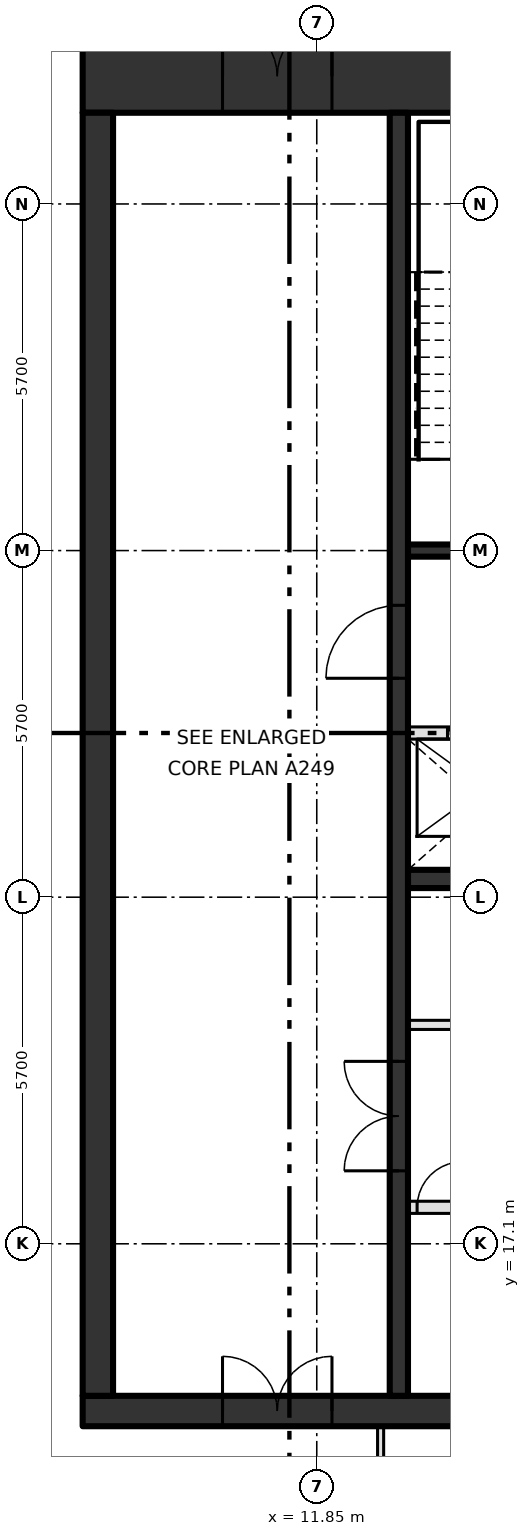
"""IFC4 building model, lengths in metres.
Left out: names, types, materials, properties, quantities, classifications, styles, units other than length and angle.
Written with IfcOpenShell. Run it as: python <this file> out.ifc"""

import sys

from ifc_helpers import new_model, si_unit, direction, frame, frame_2d, origin, place, context, subcontext, project, spatial, rectangle, extrude, element, fill, save


model = new_model("IFC4")
c1 = context("Model", 3, precision=1e-05, world=origin(), true_north=direction((0.0, 1.0)))
c2 = subcontext(c1, "Body", "Model", "MODEL_VIEW")
j1 = project(units=[si_unit("LENGTHUNIT", "METRE"), si_unit("PLANEANGLEUNIT", "RADIAN")], contexts=[c1])
p1 = place(None, origin())
s1 = spatial("IfcSite", under=j1, at=p1, CompositionType="ELEMENT")
p2 = place(p1, origin())
s2 = spatial("IfcBuilding", under=s1, at=p2, CompositionType="ELEMENT")
p3 = place(p2, frame((0.0, 0.0, 379.2)))
s3 = spatial("IfcBuildingStorey", under=s2, at=p3, CompositionType="ELEMENT", Elevation=379.2)
p4 = place(p3, frame((8.0, 14.35, -0.3), z_axis=(0.0, 0.0, 1.0), x_axis=(1.0, 0.0, 0.0)))
e1 = element("IfcWall", 1, at=p4, inside=s3, PredefinedType="SHEAR", context=c2, shape_type="SweptSolid", body=[
    extrude(rectangle(XDim=22.8, YDim=0.5, at=frame_2d((11.4, 0.0))), origin(), (0.0, 0.0, 1.0), 4.2),
])
p5 = place(p4, frame((2.3, 0.0, 0.3)))
e2 = element("IfcOpeningElement", 2, at=p5, cuts=e1, PredefinedType="OPENING", context=c2, shape_type="SweptSolid", body=[
    extrude(rectangle(XDim=1.8, YDim=2.1, at=frame_2d((0.9, 1.05))), frame((0.0, 0.26, 0.0), z_axis=(0.0, -1.0, 0.0), x_axis=(1.0, 0.0, 0.0)), (0.0, 0.0, 1.0), 0.52),
])
p6 = place(p3, frame((8.0, 36.3, -0.3), z_axis=(0.0, 0.0, 1.0), x_axis=(1.0, 0.0, 0.0)))
e3 = element("IfcWall", 3, at=p6, inside=s3, PredefinedType="SHEAR", context=c2, shape_type="SweptSolid", body=[
    extrude(rectangle(XDim=22.8, YDim=1.2, at=frame_2d((11.4, 0.0))), origin(), (0.0, 0.0, 1.0), 4.2),
])
p7 = place(p6, frame((2.3, 0.0, 0.3)))
e4 = element("IfcOpeningElement", 4, at=p7, cuts=e3, PredefinedType="OPENING", context=c2, shape_type="SweptSolid", body=[
    extrude(rectangle(XDim=1.8, YDim=2.1, at=frame_2d((0.9, 1.05))), frame((0.0, 0.61, 0.0), z_axis=(0.0, -1.0, 0.0), x_axis=(1.0, 0.0, 0.0)), (0.0, 0.0, 1.0), 1.22),
])
p8 = place(p3, frame((8.25, 14.6, -0.3), z_axis=(0.0, 0.0, 1.0), x_axis=(0.0, 1.0, 0.0)))
e5 = element("IfcWall", 5, at=p8, inside=s3, PredefinedType="SHEAR", context=c2, shape_type="SweptSolid", body=[
    extrude(rectangle(XDim=21.1, YDim=0.5, at=frame_2d((10.55, 0.0))), origin(), (0.0, 0.0, 1.0), 4.2),
])
p9 = place(p3, frame((13.35, 17.7, 0.0), z_axis=(0.0, 0.0, 1.0), x_axis=(1.0, 0.0, 0.0)))
e6 = element("IfcWall", 6, at=p9, inside=s3, PredefinedType="SOLIDWALL", context=c2, shape_type="SweptSolid", body=[
    extrude(rectangle(XDim=13.425, YDim=0.2, at=frame_2d((6.712, 0.0))), origin(), (0.0, 0.0, 1.0), 3.9),
])
p10 = place(p9, frame((2.0, 0.0, 0.0)))
e7 = element("IfcOpeningElement", 7, at=p10, cuts=e6, PredefinedType="OPENING", context=c2, shape_type="SweptSolid", body=[
    extrude(rectangle(XDim=1.1, YDim=2.1, at=frame_2d((0.55, 1.05))), frame((0.0, 0.11, 0.0), z_axis=(0.0, -1.0, 0.0), x_axis=(1.0, 0.0, 0.0)), (0.0, 0.0, 1.0), 0.22),
])
p11 = place(p9, frame((4.7, 0.0, 0.0)))
e8 = element("IfcOpeningElement", 8, at=p11, cuts=e6, PredefinedType="OPENING", context=c2, shape_type="SweptSolid", body=[
    extrude(rectangle(XDim=1.1, YDim=2.1, at=frame_2d((0.55, 1.05))), frame((0.0, 0.11, 0.0), z_axis=(0.0, -1.0, 0.0), x_axis=(1.0, 0.0, 0.0)), (0.0, 0.0, 1.0), 0.22),
])
p12 = place(p9, frame((7.4, 0.0, 0.0)))
e9 = element("IfcOpeningElement", 9, at=p12, cuts=e6, PredefinedType="OPENING", context=c2, shape_type="SweptSolid", body=[
    extrude(rectangle(XDim=1.1, YDim=2.1, at=frame_2d((0.55, 1.05))), frame((0.0, 0.11, 0.0), z_axis=(0.0, -1.0, 0.0), x_axis=(1.0, 0.0, 0.0)), (0.0, 0.0, 1.0), 0.22),
])
p13 = place(p9, frame((10.1, 0.0, 0.0)))
e10 = element("IfcOpeningElement", 10, at=p13, cuts=e6, PredefinedType="OPENING", context=c2, shape_type="SweptSolid", body=[
    extrude(rectangle(XDim=1.1, YDim=2.1, at=frame_2d((0.55, 1.05))), frame((0.0, 0.11, 0.0), z_axis=(0.0, -1.0, 0.0), x_axis=(1.0, 0.0, 0.0)), (0.0, 0.0, 1.0), 0.22),
])
p14 = place(p9, frame((0.15, 0.0, 0.0)))
e11 = element("IfcOpeningElement", 11, at=p14, cuts=e6, PredefinedType="OPENING", context=c2, shape_type="SweptSolid", body=[
    extrude(rectangle(XDim=0.75, YDim=2.1, at=frame_2d((0.375, 1.05))), frame((0.0, 0.11, 0.0), z_axis=(0.0, -1.0, 0.0), x_axis=(1.0, 0.0, 0.0)), (0.0, 0.0, 1.0), 0.22),
])
p15 = place(p9, frame((12.3, 0.0, 0.0)))
e12 = element("IfcOpeningElement", 12, at=p15, cuts=e6, PredefinedType="OPENING", context=c2, shape_type="SweptSolid", body=[
    extrude(rectangle(XDim=0.75, YDim=2.1, at=frame_2d((0.375, 1.05))), frame((0.0, 0.11, 0.0), z_axis=(0.0, -1.0, 0.0), x_axis=(1.0, 0.0, 0.0)), (0.0, 0.0, 1.0), 0.22),
])
p16 = place(p3, frame((13.35, 20.7, 0.0), z_axis=(0.0, 0.0, 1.0), x_axis=(1.0, 0.0, 0.0)))
e13 = element("IfcWall", 13, at=p16, inside=s3, PredefinedType="PARTITIONING", context=c2, shape_type="SweptSolid", body=[
    extrude(rectangle(XDim=13.425, YDim=0.15, at=frame_2d((6.712, 0.0))), origin(), (0.0, 0.0, 1.0), 3.9),
])
p17 = place(p16, frame((6.15, 0.0, 0.0)))
e14 = element("IfcOpeningElement", 14, at=p17, cuts=e13, PredefinedType="OPENING", context=c2, shape_type="SweptSolid", body=[
    extrude(rectangle(XDim=0.9, YDim=2.1, at=frame_2d((0.45, 1.05))), frame((0.0, 0.085, 0.0), z_axis=(0.0, -1.0, 0.0), x_axis=(1.0, 0.0, 0.0)), (0.0, 0.0, 1.0), 0.17),
])
p18 = place(p3, frame((13.35, 23.1, 0.0), z_axis=(0.0, 0.0, 1.0), x_axis=(1.0, 0.0, 0.0)))
e15 = element("IfcWall", 15, at=p18, inside=s3, PredefinedType="SHEAR", context=c2, shape_type="SweptSolid", body=[
    extrude(rectangle(XDim=16.95, YDim=0.3, at=frame_2d((8.475, 0.0))), origin(), (0.0, 0.0, 1.0), 3.9),
])
p19 = place(p3, frame((13.35, 25.5, 0.0), z_axis=(0.0, 0.0, 1.0), x_axis=(1.0, 0.0, 0.0)))
e16 = element("IfcWall", 16, at=p19, inside=s3, PredefinedType="SOLIDWALL", context=c2, shape_type="SweptSolid", body=[
    extrude(rectangle(XDim=16.95, YDim=0.2, at=frame_2d((8.475, 0.0))), origin(), (0.0, 0.0, 1.0), 3.9),
])
p20 = place(p19, frame((0.65, 0.0, 0.0)))
e17 = element("IfcOpeningElement", 17, at=p20, cuts=e16, PredefinedType="OPENING", context=c2, shape_type="SweptSolid", body=[
    extrude(rectangle(XDim=1.1, YDim=2.1, at=frame_2d((0.55, 1.05))), frame((0.0, 0.11, 0.0), z_axis=(0.0, -1.0, 0.0), x_axis=(1.0, 0.0, 0.0)), (0.0, 0.0, 1.0), 0.22),
])
p21 = place(p19, frame((3.35, 0.0, 0.0)))
e18 = element("IfcOpeningElement", 18, at=p21, cuts=e16, PredefinedType="OPENING", context=c2, shape_type="SweptSolid", body=[
    extrude(rectangle(XDim=1.1, YDim=2.1, at=frame_2d((0.55, 1.05))), frame((0.0, 0.11, 0.0), z_axis=(0.0, -1.0, 0.0), x_axis=(1.0, 0.0, 0.0)), (0.0, 0.0, 1.0), 0.22),
])
p22 = place(p19, frame((6.05, 0.0, 0.0)))
e19 = element("IfcOpeningElement", 19, at=p22, cuts=e16, PredefinedType="OPENING", context=c2, shape_type="SweptSolid", body=[
    extrude(rectangle(XDim=1.1, YDim=2.1, at=frame_2d((0.55, 1.05))), frame((0.0, 0.11, 0.0), z_axis=(0.0, -1.0, 0.0), x_axis=(1.0, 0.0, 0.0)), (0.0, 0.0, 1.0), 0.22),
])
p23 = place(p19, frame((8.75, 0.0, 0.0)))
e20 = element("IfcOpeningElement", 20, at=p23, cuts=e16, PredefinedType="OPENING", context=c2, shape_type="SweptSolid", body=[
    extrude(rectangle(XDim=1.1, YDim=2.1, at=frame_2d((0.55, 1.05))), frame((0.0, 0.11, 0.0), z_axis=(0.0, -1.0, 0.0), x_axis=(1.0, 0.0, 0.0)), (0.0, 0.0, 1.0), 0.22),
])
p24 = place(p19, frame((13.0, 0.0, 0.0)))
e21 = element("IfcOpeningElement", 21, at=p24, cuts=e16, PredefinedType="OPENING", context=c2, shape_type="SweptSolid", body=[
    extrude(rectangle(XDim=0.9, YDim=2.1, at=frame_2d((0.45, 1.05))), frame((0.0, 0.11, 0.0), z_axis=(0.0, -1.0, 0.0), x_axis=(1.0, 0.0, 0.0)), (0.0, 0.0, 1.0), 0.22),
])
p25 = place(p3, frame((13.35, 28.5, 0.0), z_axis=(0.0, 0.0, 1.0), x_axis=(1.0, 0.0, 0.0)))
e22 = element("IfcWall", 22, at=p25, inside=s3, PredefinedType="SOLIDWALL", context=c2, shape_type="SweptSolid", body=[
    extrude(rectangle(XDim=6.75, YDim=0.2, at=frame_2d((3.375, 0.0))), origin(), (0.0, 0.0, 1.0), 3.9),
])
p26 = place(p25, frame((0.95, 0.0, 0.0)))
e23 = element("IfcOpeningElement", 23, at=p26, cuts=e22, PredefinedType="OPENING", context=c2, shape_type="SweptSolid", body=[
    extrude(rectangle(XDim=1.2, YDim=2.1, at=frame_2d((0.6, 1.05))), frame((0.0, 0.11, 0.0), z_axis=(0.0, -1.0, 0.0), x_axis=(1.0, 0.0, 0.0)), (0.0, 0.0, 1.0), 0.22),
])
p27 = place(p25, frame((3.75, 0.0, 0.0)))
e24 = element("IfcOpeningElement", 24, at=p27, cuts=e22, PredefinedType="OPENING", context=c2, shape_type="SweptSolid", body=[
    extrude(rectangle(XDim=1.1, YDim=2.1, at=frame_2d((0.55, 1.05))), frame((0.0, 0.11, 0.0), z_axis=(0.0, -1.0, 0.0), x_axis=(1.0, 0.0, 0.0)), (0.0, 0.0, 1.0), 0.22),
])
p28 = place(p3, frame((13.2, 14.6, 0.0), z_axis=(0.0, 0.0, 1.0), x_axis=(0.0, 1.0, 0.0)))
e25 = element("IfcWall", 25, at=p28, inside=s3, PredefinedType="SHEAR", context=c2, shape_type="SweptSolid", body=[
    extrude(rectangle(XDim=21.1, YDim=0.3, at=frame_2d((10.55, 0.0))), origin(), (0.0, 0.0, 1.0), 3.9),
])
p29 = place(p28, frame((3.7, 0.0, 0.0)))
e26 = element("IfcOpeningElement", 26, at=p29, cuts=e25, PredefinedType="OPENING", context=c2, shape_type="SweptSolid", body=[
    extrude(rectangle(XDim=1.8, YDim=2.1, at=frame_2d((0.9, 1.05))), frame((0.0, 0.16, 0.0), z_axis=(0.0, -1.0, 0.0), x_axis=(1.0, 0.0, 0.0)), (0.0, 0.0, 1.0), 0.32),
])
p30 = place(p28, frame((11.8, 0.0, 0.0)))
e27 = element("IfcOpeningElement", 27, at=p30, cuts=e25, PredefinedType="OPENING", context=c2, shape_type="SweptSolid", body=[
    extrude(rectangle(XDim=1.2, YDim=2.1, at=frame_2d((0.6, 1.05))), frame((0.0, 0.16, 0.0), z_axis=(0.0, -1.0, 0.0), x_axis=(1.0, 0.0, 0.0)), (0.0, 0.0, 1.0), 0.32),
])
p31 = place(p3, frame((12.9, 10.078, 0.0), z_axis=(0.0, 0.0, 1.0), x_axis=(0.0, 1.0, 0.0)))
e28 = element("IfcWall", 28, at=p31, inside=s3, PredefinedType="PARTITIONING", context=c2, shape_type="SweptSolid", body=[
    extrude(rectangle(XDim=4.022, YDim=0.1, at=frame_2d((2.011, 0.0))), origin(), (0.0, 0.0, 1.0), 3.9),
])
p32 = place(p20, origin())
e29 = element("IfcDoor", 29, at=p32, inside=s3, OperationType="SLIDING_TO_LEFT", PredefinedType="DOOR", context=c2, shape_type="SweptSolid", body=[
    extrude(rectangle(XDim=1.1, YDim=2.1, at=frame_2d((0.55, 1.05))), frame((0.0, 0.025, 0.0), z_axis=(0.0, -1.0, 0.0), x_axis=(1.0, 0.0, 0.0)), (0.0, 0.0, 1.0), 0.05),
])
fill(e17, e29)
p33 = place(p14, origin())
e30 = element("IfcDoor", 30, at=p33, inside=s3, OperationType="SINGLE_SWING_RIGHT", PredefinedType="DOOR", context=c2, shape_type="SweptSolid", body=[
    extrude(rectangle(XDim=0.75, YDim=2.1, at=frame_2d((0.375, 1.05))), frame((0.0, 0.025, 0.0), z_axis=(0.0, -1.0, 0.0), x_axis=(1.0, 0.0, 0.0)), (0.0, 0.0, 1.0), 0.05),
])
fill(e11, e30)
p34 = place(p29, origin())
e31 = element("IfcDoor", 31, at=p34, inside=s3, OperationType="DOUBLE_DOOR_SINGLE_SWING", PredefinedType="DOOR", context=c2, shape_type="SweptSolid", body=[
    extrude(rectangle(XDim=1.8, YDim=2.1, at=frame_2d((0.9, 1.05))), frame((0.0, 0.025, 0.0), z_axis=(0.0, -1.0, 0.0), x_axis=(1.0, 0.0, 0.0)), (0.0, 0.0, 1.0), 0.05),
])
fill(e26, e31)
p35 = place(p30, origin())
e32 = element("IfcDoor", 32, at=p35, inside=s3, OperationType="SINGLE_SWING_LEFT", PredefinedType="DOOR", context=c2, shape_type="SweptSolid", body=[
    extrude(rectangle(XDim=1.2, YDim=2.1, at=frame_2d((0.6, 1.05))), frame((0.0, 0.025, 0.0), z_axis=(0.0, -1.0, 0.0), x_axis=(1.0, 0.0, 0.0)), (0.0, 0.0, 1.0), 0.05),
])
fill(e27, e32)
p36 = place(p7, origin())
e33 = element("IfcDoor", 33, at=p36, inside=s3, OperationType="DOUBLE_DOOR_SINGLE_SWING", PredefinedType="DOOR", context=c2, shape_type="SweptSolid", body=[
    extrude(rectangle(XDim=1.8, YDim=2.1, at=frame_2d((0.9, 1.05))), frame((0.0, 0.025, 0.0), z_axis=(0.0, -1.0, 0.0), x_axis=(1.0, 0.0, 0.0)), (0.0, 0.0, 1.0), 0.05),
])
fill(e4, e33)
p37 = place(p5, origin())
e34 = element("IfcDoor", 34, at=p37, inside=s3, OperationType="DOUBLE_DOOR_SINGLE_SWING", PredefinedType="DOOR", context=c2, shape_type="SweptSolid", body=[
    extrude(rectangle(XDim=1.8, YDim=2.1, at=frame_2d((0.9, 1.05))), frame((0.0, 0.025, 0.0), z_axis=(0.0, -1.0, 0.0), x_axis=(1.0, 0.0, 0.0)), (0.0, 0.0, 1.0), 0.05),
])
fill(e2, e34)
save(model, sys.argv[1])
